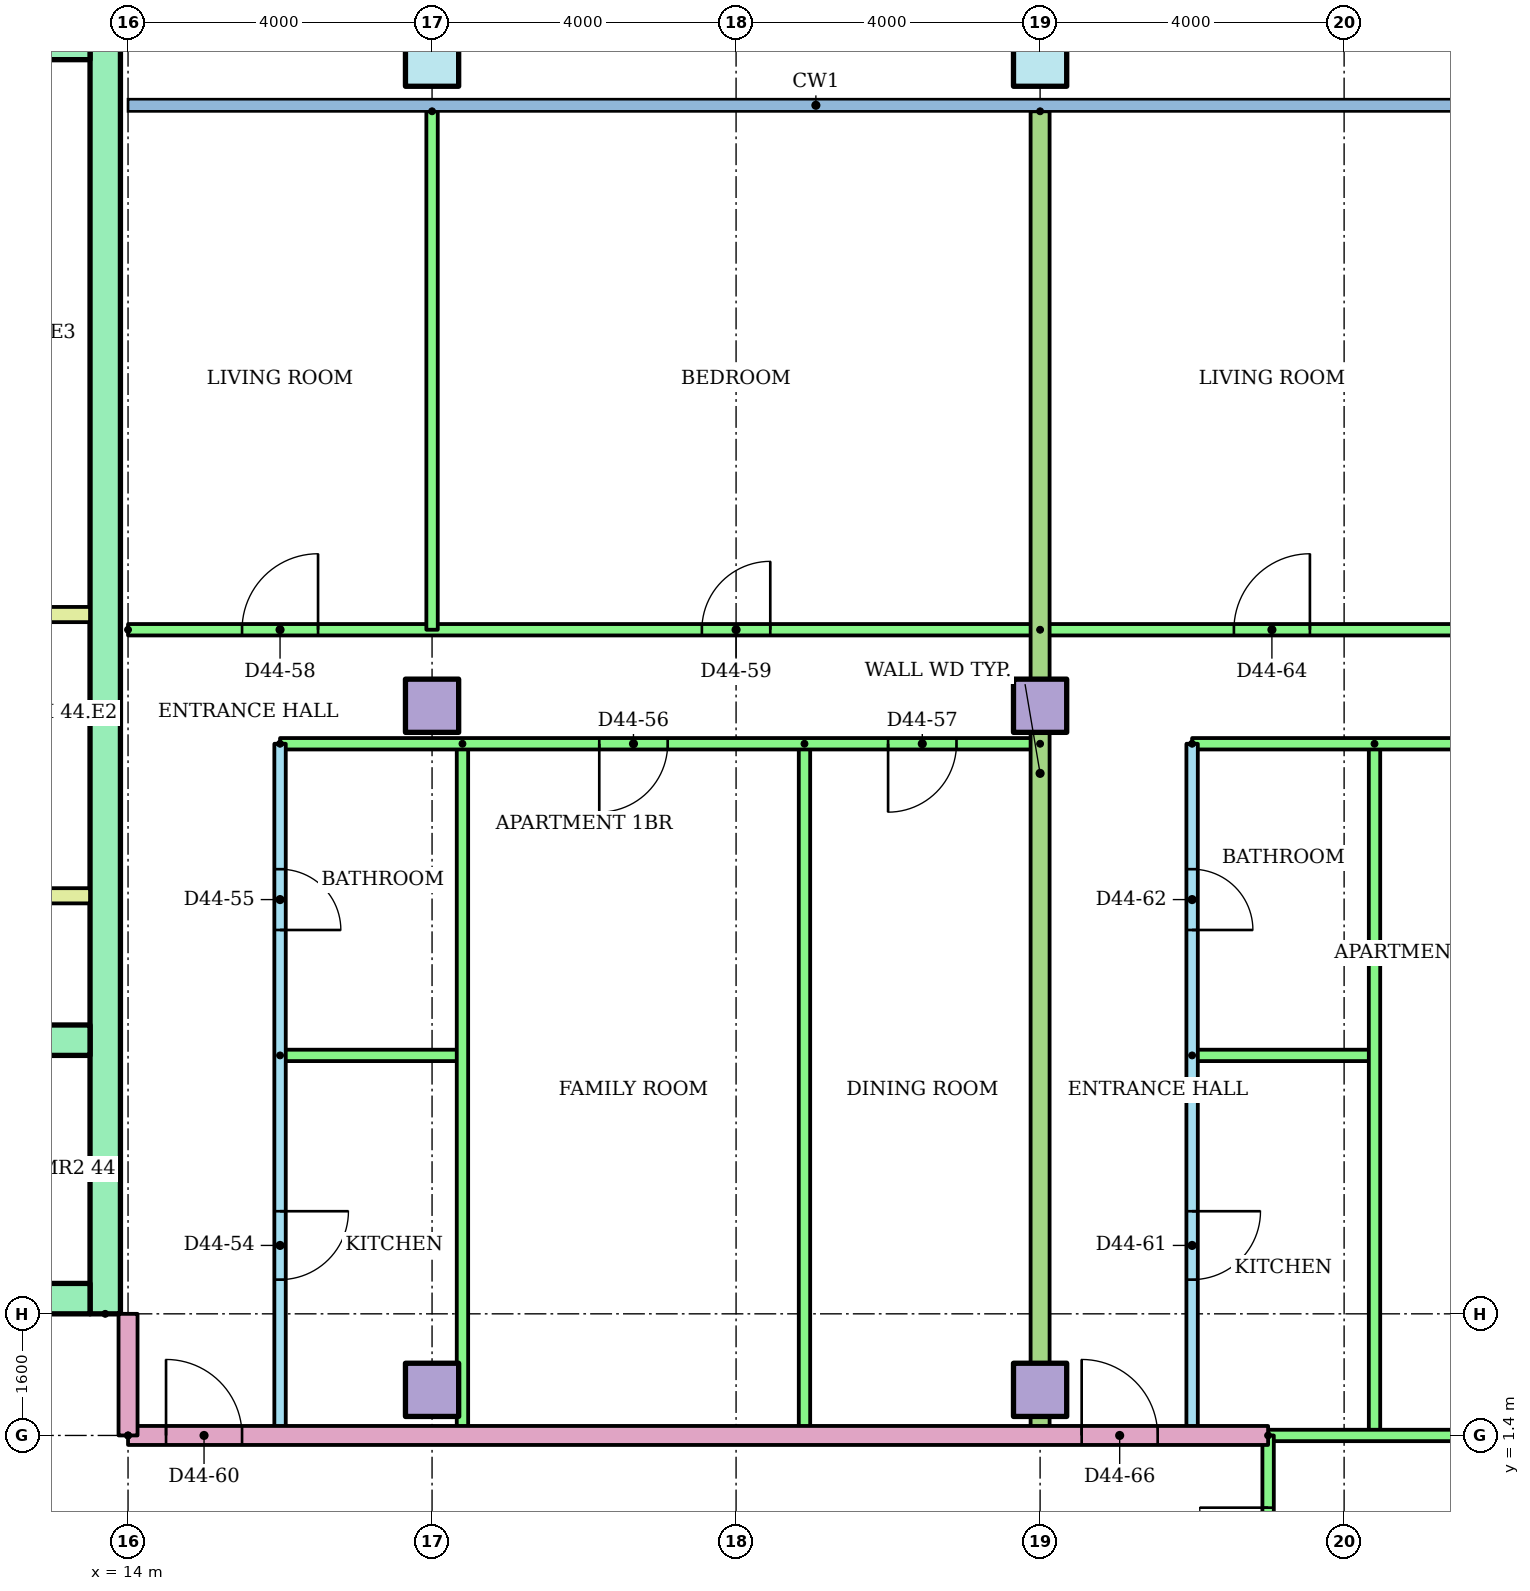
"""IFC4 building model, lengths in metres.
Left out: names, types, materials, properties, quantities, classifications, styles, units other than length and angle.
Written with IfcOpenShell. Run it as: python <this file> out.ifc"""

import sys

from ifc_helpers import new_model, si_unit, direction, frame, frame_2d, origin, origin_2d, place, context, subcontext, project, spatial, rectangle, hollow_rectangle, extrude, element, fill, save


model = new_model("IFC4")
c1 = context("Model", 3, precision=1e-05, world=origin(), true_north=direction((0.0, 1.0)))
c2 = subcontext(c1, "Body", "Model", "MODEL_VIEW")
j1 = project(units=[si_unit("LENGTHUNIT", "METRE"), si_unit("PLANEANGLEUNIT", "RADIAN")], contexts=[c1])
p1 = place(None, origin())
s1 = spatial("IfcSite", under=j1, at=p1, CompositionType="ELEMENT")
p2 = place(p1, origin())
s2 = spatial("IfcBuilding", under=s1, at=p2, CompositionType="ELEMENT")
p3 = place(p2, frame((0.0, 0.0, 171.7)))
s3 = spatial("IfcBuildingStorey", under=s2, at=p3, CompositionType="ELEMENT", Elevation=171.7)
for number, where in (
    (1, (18.0, 2.0, 0.0)),
    (2, (26.0, 2.0, 0.0)),
    (3, (18.0, 11.0, 0.0)),
    (4, (26.0, 11.0, 0.0)),
):
    element("IfcColumn", number, at=place(p3, frame(where)), inside=s3, PredefinedType="COLUMN", context=c2, shape_type="SweptSolid", body=[
        extrude(rectangle(XDim=0.7, YDim=0.7, at=origin_2d()), origin(), (0.0, 0.0, 1.0), 3.2),
    ])
for number, where in (
    (5, (18.0, 19.5, 0.0)),
    (6, (26.0, 19.5, 0.0)),
):
    element("IfcColumn", number, at=place(p3, frame(where)), inside=s3, PredefinedType="COLUMN", context=c2, shape_type="SweptSolid", body=[
        extrude(hollow_rectangle(XDim=0.7, YDim=0.7, WallThickness=0.036, at=origin_2d()), origin(), (0.0, 0.0, 1.0), 3.2),
    ])
p4 = place(p3, frame((13.7, 3.0, 0.0), z_axis=(0.0, 0.0, 1.0), x_axis=(0.0, 1.0, 0.0)))
e7 = element("IfcWall", 7, at=p4, inside=s3, PredefinedType="SHEAR", context=c2, shape_type="SweptSolid", body=[
    extrude(rectangle(XDim=17.0, YDim=0.4, at=frame_2d((8.5, 0.0))), origin(), (0.0, 0.0, 1.0), 2.92),
])
p5 = place(p3, frame((-13.5, 19.7, 0.0)))
e8 = element("IfcWall", 8, at=p5, inside=s3, PredefinedType="SHEAR", context=c2, shape_type="SweptSolid", body=[
    extrude(rectangle(XDim=27.0, YDim=0.4, at=frame_2d((13.5, 0.0))), origin(), (0.0, 0.0, 1.0), 2.92),
])
p6 = place(p3, frame((-13.5, 3.2, 0.0)))
e9 = element("IfcWall", 9, at=p6, inside=s3, PredefinedType="SHEAR", context=c2, shape_type="SweptSolid", body=[
    extrude(rectangle(XDim=27.0, YDim=0.4, at=frame_2d((13.5, 0.0))), origin(), (0.0, 0.0, 1.0), 2.92),
])
p7 = place(p6, frame((22.083, 0.0, 0.0)))
e10 = element("IfcOpeningElement", 10, at=p7, cuts=e9, PredefinedType="OPENING", context=c2, shape_type="SweptSolid", body=[
    extrude(rectangle(XDim=1.1, YDim=2.1, at=frame_2d((0.55, 1.05))), frame((0.0, 0.21, 0.0), z_axis=(0.0, -1.0, 0.0), x_axis=(1.0, 0.0, 0.0)), (0.0, 0.0, 1.0), 0.42),
])
p8 = place(p6, frame((25.128, 0.0, 0.0)))
e11 = element("IfcOpeningElement", 11, at=p8, cuts=e9, PredefinedType="OPENING", context=c2, shape_type="SweptSolid", body=[
    extrude(rectangle(XDim=1.1, YDim=2.1, at=frame_2d((0.55, 1.05))), frame((0.0, 0.21, 0.0), z_axis=(0.0, -1.0, 0.0), x_axis=(1.0, 0.0, 0.0)), (0.0, 0.0, 1.0), 0.42),
])
p9 = place(p6, frame((12.6, 0.0, 0.0)))
e12 = element("IfcOpeningElement", 12, at=p9, cuts=e9, PredefinedType="OPENING", context=c2, shape_type="SweptSolid", body=[
    extrude(rectangle(XDim=1.8, YDim=2.1, at=frame_2d((0.9, 1.05))), frame((0.0, 0.21, 0.0), z_axis=(0.0, -1.0, 0.0), x_axis=(1.0, 0.0, 0.0)), (0.0, 0.0, 1.0), 0.42),
])
p10 = place(p3, frame((1.522, 6.6, 0.0)))
e13 = element("IfcWall", 13, at=p10, inside=s3, PredefinedType="SHEAR", context=c2, shape_type="SweptSolid", body=[
    extrude(rectangle(XDim=11.978, YDim=0.4, at=frame_2d((5.989, 0.0))), origin(), (0.0, 0.0, 1.0), 2.92),
])
p11 = place(p10, frame((1.022, 0.0, 0.0)))
e14 = element("IfcOpeningElement", 14, at=p11, cuts=e13, PredefinedType="OPENING", context=c2, shape_type="SweptSolid", body=[
    extrude(rectangle(XDim=1.0, YDim=2.1, at=frame_2d((0.5, 1.05))), frame((0.0, 0.21, 0.0), z_axis=(0.0, -1.0, 0.0), x_axis=(1.0, 0.0, 0.0)), (0.0, 0.0, 1.0), 0.42),
])
p12 = place(p10, frame((4.067, 0.0, 0.0)))
e15 = element("IfcOpeningElement", 15, at=p12, cuts=e13, PredefinedType="OPENING", context=c2, shape_type="SweptSolid", body=[
    extrude(rectangle(XDim=1.0, YDim=2.1, at=frame_2d((0.5, 1.05))), frame((0.0, 0.21, 0.0), z_axis=(0.0, -1.0, 0.0), x_axis=(1.0, 0.0, 0.0)), (0.0, 0.0, 1.0), 0.42),
])
for number, where in (
    (16, (9.6, 8.5, 0.0)),
    (17, (9.6, 12.2, 0.0)),
):
    element("IfcWall", number, at=place(p3, frame(where)), inside=s3, PredefinedType="PARTITIONING", context=c2, shape_type="SweptSolid", body=[
        extrude(rectangle(XDim=3.9, YDim=0.2, at=frame_2d((1.95, 0.0))), origin(), (0.0, 0.0, 1.0), 2.92),
    ])
p13 = place(p3, frame((16.0, 10.5, 0.0), z_axis=(0.0, 0.0, 1.0), x_axis=(0.0, -1.0, 0.0)))
e18 = element("IfcWall", 18, at=p13, inside=s3, PredefinedType="PARTITIONING", context=c2, shape_type="SweptSolid", body=[
    extrude(rectangle(XDim=9.1, YDim=0.15, at=frame_2d((4.55, 0.0))), origin(), (0.0, 0.0, 1.0), 2.4),
])
p14 = place(p13, frame((6.15, 0.0, 0.0)))
e19 = element("IfcOpeningElement", 19, at=p14, cuts=e18, PredefinedType="OPENING", context=c2, shape_type="SweptSolid", body=[
    extrude(rectangle(XDim=0.9, YDim=2.1, at=frame_2d((0.45, 1.05))), frame((0.0, 0.085, 0.0), z_axis=(0.0, -1.0, 0.0), x_axis=(1.0, 0.0, 0.0)), (0.0, 0.0, 1.0), 0.17),
])
p15 = place(p13, frame((1.65, 0.0, 0.0)))
e20 = element("IfcOpeningElement", 20, at=p15, cuts=e18, PredefinedType="OPENING", context=c2, shape_type="SweptSolid", body=[
    extrude(rectangle(XDim=0.8, YDim=2.1, at=frame_2d((0.4, 1.05))), frame((0.0, 0.085, 0.0), z_axis=(0.0, -1.0, 0.0), x_axis=(1.0, 0.0, 0.0)), (0.0, 0.0, 1.0), 0.17),
])
p16 = place(p3, frame((16.0, 6.4, 0.0)))
e21 = element("IfcWall", 21, at=p16, inside=s3, PredefinedType="PARTITIONING", context=c2, shape_type="SweptSolid", body=[
    extrude(rectangle(XDim=2.4, YDim=0.15, at=frame_2d((1.2, 0.0))), origin(), (0.0, 0.0, 1.0), 2.4),
])
for number, where, z_axis, x_axis in (
    (22, (18.4, 10.5, 0.0), (0.0, 0.0, 1.0), (0.0, -1.0, 0.0)),
    (23, (22.9, 10.5, 0.0), (0.0, 0.0, 1.0), (0.0, -1.0, 0.0)),
):
    element("IfcWall", number, at=place(p3, frame(where, z_axis=z_axis, x_axis=x_axis)), inside=s3, PredefinedType="PARTITIONING", context=c2, shape_type="SweptSolid", body=[
        extrude(rectangle(XDim=9.1, YDim=0.15, at=frame_2d((4.55, 0.0))), origin(), (0.0, 0.0, 1.0), 2.4),
    ])
p17 = place(p3, frame((26.0, 10.5, 0.0), z_axis=(0.0, 0.0, 1.0), x_axis=(-1.0, 0.0, 0.0)))
e24 = element("IfcWall", 24, at=p17, inside=s3, PredefinedType="PARTITIONING", context=c2, shape_type="SweptSolid", body=[
    extrude(rectangle(XDim=10.0, YDim=0.15, at=frame_2d((5.0, 0.0))), origin(), (0.0, 0.0, 1.0), 2.4),
])
p18 = place(p17, frame((4.9, 0.0, 0.0)))
e25 = element("IfcOpeningElement", 25, at=p18, cuts=e24, PredefinedType="OPENING", context=c2, shape_type="SweptSolid", body=[
    extrude(rectangle(XDim=0.9, YDim=2.1, at=frame_2d((0.45, 1.05))), frame((0.0, 0.085, 0.0), z_axis=(0.0, -1.0, 0.0), x_axis=(1.0, 0.0, 0.0)), (0.0, 0.0, 1.0), 0.17),
])
p19 = place(p17, frame((1.1, 0.0, 0.0)))
e26 = element("IfcOpeningElement", 26, at=p19, cuts=e24, PredefinedType="OPENING", context=c2, shape_type="SweptSolid", body=[
    extrude(rectangle(XDim=0.9, YDim=2.1, at=frame_2d((0.45, 1.05))), frame((0.0, 0.085, 0.0), z_axis=(0.0, -1.0, 0.0), x_axis=(1.0, 0.0, 0.0)), (0.0, 0.0, 1.0), 0.17),
])
p20 = place(p3, frame((14.0, 12.0, 0.0)))
e27 = element("IfcWall", 27, at=p20, inside=s3, PredefinedType="PARTITIONING", context=c2, shape_type="SweptSolid", body=[
    extrude(rectangle(XDim=12.0, YDim=0.15, at=frame_2d((6.0, 0.0))), origin(), (0.0, 0.0, 1.0), 2.4),
])
p21 = place(p20, frame((1.5, 0.0, 0.0)))
e28 = element("IfcOpeningElement", 28, at=p21, cuts=e27, PredefinedType="OPENING", context=c2, shape_type="SweptSolid", body=[
    extrude(rectangle(XDim=1.0, YDim=2.1, at=frame_2d((0.5, 1.05))), frame((0.0, 0.085, 0.0), z_axis=(0.0, -1.0, 0.0), x_axis=(1.0, 0.0, 0.0)), (0.0, 0.0, 1.0), 0.17),
])
p22 = place(p20, frame((7.55, 0.0, 0.0)))
e29 = element("IfcOpeningElement", 29, at=p22, cuts=e27, PredefinedType="OPENING", context=c2, shape_type="SweptSolid", body=[
    extrude(rectangle(XDim=0.9, YDim=2.1, at=frame_2d((0.45, 1.05))), frame((0.0, 0.085, 0.0), z_axis=(0.0, -1.0, 0.0), x_axis=(1.0, 0.0, 0.0)), (0.0, 0.0, 1.0), 0.17),
])
p23 = place(p3, frame((18.0, 18.821, 0.0), z_axis=(0.0, 0.0, 1.0), x_axis=(0.0, -1.0, 0.0)))
e30 = element("IfcWall", 30, at=p23, inside=s3, PredefinedType="PARTITIONING", context=c2, shape_type="SweptSolid", body=[
    extrude(rectangle(XDim=6.821, YDim=0.15, at=frame_2d((3.411, 0.0))), origin(), (0.0, 0.0, 1.0), 2.4),
])
p24 = place(p3, frame((28.0, 10.5, 0.0), z_axis=(0.0, 0.0, 1.0), x_axis=(0.0, -1.0, 0.0)))
e31 = element("IfcWall", 31, at=p24, inside=s3, PredefinedType="PARTITIONING", context=c2, shape_type="SweptSolid", body=[
    extrude(rectangle(XDim=9.1, YDim=0.15, at=frame_2d((4.55, 0.0))), origin(), (0.0, 0.0, 1.0), 2.4),
])
p25 = place(p24, frame((6.15, 0.0, 0.0)))
e32 = element("IfcOpeningElement", 32, at=p25, cuts=e31, PredefinedType="OPENING", context=c2, shape_type="SweptSolid", body=[
    extrude(rectangle(XDim=0.9, YDim=2.1, at=frame_2d((0.45, 1.05))), frame((0.0, 0.085, 0.0), z_axis=(0.0, -1.0, 0.0), x_axis=(1.0, 0.0, 0.0)), (0.0, 0.0, 1.0), 0.17),
])
p26 = place(p24, frame((1.65, 0.0, 0.0)))
e33 = element("IfcOpeningElement", 33, at=p26, cuts=e31, PredefinedType="OPENING", context=c2, shape_type="SweptSolid", body=[
    extrude(rectangle(XDim=0.8, YDim=2.1, at=frame_2d((0.4, 1.05))), frame((0.0, 0.085, 0.0), z_axis=(0.0, -1.0, 0.0), x_axis=(1.0, 0.0, 0.0)), (0.0, 0.0, 1.0), 0.17),
])
p27 = place(p3, frame((28.0, 6.4, 0.0)))
e34 = element("IfcWall", 34, at=p27, inside=s3, PredefinedType="PARTITIONING", context=c2, shape_type="SweptSolid", body=[
    extrude(rectangle(XDim=2.4, YDim=0.15, at=frame_2d((1.2, 0.0))), origin(), (0.0, 0.0, 1.0), 2.4),
])
p28 = place(p3, frame((30.4, 10.5, 0.0), z_axis=(0.0, 0.0, 1.0), x_axis=(0.0, -1.0, 0.0)))
e35 = element("IfcWall", 35, at=p28, inside=s3, PredefinedType="PARTITIONING", context=c2, shape_type="SweptSolid", body=[
    extrude(rectangle(XDim=9.1, YDim=0.15, at=frame_2d((4.55, 0.0))), origin(), (0.0, 0.0, 1.0), 2.4),
])
p29 = place(p3, frame((36.81, 10.5, 0.0), z_axis=(0.0, 0.0, 1.0), x_axis=(-1.0, 0.0, 0.0)))
e36 = element("IfcWall", 36, at=p29, inside=s3, PredefinedType="PARTITIONING", context=c2, shape_type="SweptSolid", body=[
    extrude(rectangle(XDim=8.81, YDim=0.15, at=frame_2d((4.405, 0.0))), origin(), (0.0, 0.0, 1.0), 2.4),
])
p30 = place(p29, frame((3.357, 0.0, 0.0)))
e37 = element("IfcOpeningElement", 37, at=p30, cuts=e36, PredefinedType="OPENING", context=c2, shape_type="SweptSolid", body=[
    extrude(rectangle(XDim=0.9, YDim=2.1, at=frame_2d((0.45, 1.05))), frame((0.0, 0.085, 0.0), z_axis=(0.0, -1.0, 0.0), x_axis=(1.0, 0.0, 0.0)), (0.0, 0.0, 1.0), 0.17),
])
p31 = place(p3, frame((26.0, 12.0, 0.0)))
e38 = element("IfcWall", 38, at=p31, inside=s3, PredefinedType="PARTITIONING", context=c2, shape_type="SweptSolid", body=[
    extrude(rectangle(XDim=10.82, YDim=0.15, at=frame_2d((5.41, 0.0))), origin(), (0.0, 0.0, 1.0), 2.4),
])
p32 = place(p31, frame((2.55, 0.0, 0.0)))
e39 = element("IfcOpeningElement", 39, at=p32, cuts=e38, PredefinedType="OPENING", context=c2, shape_type="SweptSolid", body=[
    extrude(rectangle(XDim=1.0, YDim=2.1, at=frame_2d((0.5, 1.05))), frame((0.0, 0.085, 0.0), z_axis=(0.0, -1.0, 0.0), x_axis=(1.0, 0.0, 0.0)), (0.0, 0.0, 1.0), 0.17),
])
p33 = place(p31, frame((8.547, 0.0, 0.0)))
e40 = element("IfcOpeningElement", 40, at=p33, cuts=e38, PredefinedType="OPENING", context=c2, shape_type="SweptSolid", body=[
    extrude(rectangle(XDim=1.0, YDim=2.1, at=frame_2d((0.5, 1.05))), frame((0.0, 0.085, 0.0), z_axis=(0.0, -1.0, 0.0), x_axis=(1.0, 0.0, 0.0)), (0.0, 0.0, 1.0), 0.17),
])
p34 = place(p3, frame((26.0, 18.821, 0.0), z_axis=(0.0, 0.0, 1.0), x_axis=(0.0, -1.0, 0.0)))
e41 = element("IfcWall", 41, at=p34, inside=s3, PredefinedType="PARTITIONING", context=c2, shape_type="SweptSolid", body=[
    extrude(rectangle(XDim=17.421, YDim=0.25, at=frame_2d((8.71, 0.0))), origin(), (0.0, 0.0, 1.0), 2.4),
])
p35 = place(p3, frame((14.0, 1.4, 0.0)))
e42 = element("IfcWall", 42, at=p35, inside=s3, PredefinedType="PARTITIONING", context=c2, shape_type="SweptSolid", body=[
    extrude(rectangle(XDim=15.0, YDim=0.25, at=frame_2d((7.5, 0.0))), origin(), (0.0, 0.0, 1.0), 2.4),
])
p36 = place(p35, frame((0.5, 0.0, 0.0)))
e43 = element("IfcOpeningElement", 43, at=p36, cuts=e42, PredefinedType="OPENING", context=c2, shape_type="SweptSolid", body=[
    extrude(rectangle(XDim=1.0, YDim=2.1, at=frame_2d((0.5, 1.05))), frame((0.0, 0.135, 0.0), z_axis=(0.0, -1.0, 0.0), x_axis=(1.0, 0.0, 0.0)), (0.0, 0.0, 1.0), 0.27),
])
p37 = place(p35, frame((12.547, 0.0, 0.0)))
e44 = element("IfcOpeningElement", 44, at=p37, cuts=e42, PredefinedType="OPENING", context=c2, shape_type="SweptSolid", body=[
    extrude(rectangle(XDim=1.0, YDim=2.1, at=frame_2d((0.5, 1.05))), frame((0.0, 0.135, 0.0), z_axis=(0.0, -1.0, 0.0), x_axis=(1.0, 0.0, 0.0)), (0.0, 0.0, 1.0), 0.27),
])
p38 = place(p3, frame((29.0, 1.4, 0.0)))
e45 = element("IfcWall", 45, at=p38, inside=s3, PredefinedType="PARTITIONING", context=c2, shape_type="SweptSolid", body=[
    extrude(rectangle(XDim=7.82, YDim=0.15, at=frame_2d((3.91, 0.0))), origin(), (0.0, 0.0, 1.0), 2.4),
])
p39 = place(p3, frame((29.0, -1.4, 0.0), z_axis=(0.0, 0.0, 1.0), x_axis=(0.0, 1.0, 0.0)))
e46 = element("IfcWall", 46, at=p39, inside=s3, PredefinedType="PARTITIONING", context=c2, shape_type="SweptSolid", body=[
    extrude(rectangle(XDim=2.8, YDim=0.15, at=frame_2d((1.4, 0.0))), origin(), (0.0, 0.0, 1.0), 2.4),
])
p40 = place(p39, frame((0.95, 0.0, 0.0)))
e47 = element("IfcOpeningElement", 47, at=p40, cuts=e46, PredefinedType="OPENING", context=c2, shape_type="SweptSolid", body=[
    extrude(rectangle(XDim=0.9, YDim=2.1, at=frame_2d((0.45, 1.05))), frame((0.0, 0.085, 0.0), z_axis=(0.0, -1.0, 0.0), x_axis=(1.0, 0.0, 0.0)), (0.0, 0.0, 1.0), 0.17),
])
p41 = place(p3, frame((14.0, 1.4, 0.0), z_axis=(0.0, 0.0, 1.0), x_axis=(0.0, 1.0, 0.0)))
e48 = element("IfcWall", 48, at=p41, inside=s3, PredefinedType="PARTITIONING", context=c2, shape_type="SweptSolid", body=[
    extrude(rectangle(XDim=1.6, YDim=0.25, at=frame_2d((0.8, 0.0))), origin(), (0.0, 0.0, 1.0), 2.4),
])
p42 = place(p14, origin())
e49 = element("IfcDoor", 49, at=p42, inside=s3, OperationType="SINGLE_SWING_LEFT", PredefinedType="DOOR", context=c2, shape_type="SweptSolid", body=[
    extrude(rectangle(XDim=0.9, YDim=2.1, at=frame_2d((0.45, 1.05))), frame((0.0, 0.025, 0.0), z_axis=(0.0, -1.0, 0.0), x_axis=(1.0, 0.0, 0.0)), (0.0, 0.0, 1.0), 0.05),
])
fill(e19, e49)
p43 = place(p15, origin())
e50 = element("IfcDoor", 50, at=p43, inside=s3, OperationType="SINGLE_SWING_RIGHT", PredefinedType="DOOR", context=c2, shape_type="SweptSolid", body=[
    extrude(rectangle(XDim=0.8, YDim=2.1, at=frame_2d((0.4, 1.05))), frame((0.0, 0.025, 0.0), z_axis=(0.0, -1.0, 0.0), x_axis=(1.0, 0.0, 0.0)), (0.0, 0.0, 1.0), 0.05),
])
fill(e20, e50)
p44 = place(p18, origin())
e51 = element("IfcDoor", 51, at=p44, inside=s3, OperationType="SINGLE_SWING_RIGHT", PredefinedType="DOOR", context=c2, shape_type="SweptSolid", body=[
    extrude(rectangle(XDim=0.9, YDim=2.1, at=frame_2d((0.45, 1.05))), frame((0.0, 0.025, 0.0), z_axis=(0.0, -1.0, 0.0), x_axis=(1.0, 0.0, 0.0)), (0.0, 0.0, 1.0), 0.05),
])
fill(e25, e51)
p45 = place(p19, origin())
e52 = element("IfcDoor", 52, at=p45, inside=s3, OperationType="SINGLE_SWING_RIGHT", PredefinedType="DOOR", context=c2, shape_type="SweptSolid", body=[
    extrude(rectangle(XDim=0.9, YDim=2.1, at=frame_2d((0.45, 1.05))), frame((0.0, 0.025, 0.0), z_axis=(0.0, -1.0, 0.0), x_axis=(1.0, 0.0, 0.0)), (0.0, 0.0, 1.0), 0.05),
])
fill(e26, e52)
p46 = place(p21, origin())
e53 = element("IfcDoor", 53, at=p46, inside=s3, OperationType="SINGLE_SWING_RIGHT", PredefinedType="DOOR", context=c2, shape_type="SweptSolid", body=[
    extrude(rectangle(XDim=1.0, YDim=2.1, at=frame_2d((0.5, 1.05))), frame((0.0, 0.025, 0.0), z_axis=(0.0, -1.0, 0.0), x_axis=(1.0, 0.0, 0.0)), (0.0, 0.0, 1.0), 0.05),
])
fill(e28, e53)
p47 = place(p22, origin())
e54 = element("IfcDoor", 54, at=p47, inside=s3, OperationType="SINGLE_SWING_RIGHT", PredefinedType="DOOR", context=c2, shape_type="SweptSolid", body=[
    extrude(rectangle(XDim=0.9, YDim=2.1, at=frame_2d((0.45, 1.05))), frame((0.0, 0.025, 0.0), z_axis=(0.0, -1.0, 0.0), x_axis=(1.0, 0.0, 0.0)), (0.0, 0.0, 1.0), 0.05),
])
fill(e29, e54)
p48 = place(p36, origin())
e55 = element("IfcDoor", 55, at=p48, inside=s3, OperationType="SINGLE_SWING_LEFT", PredefinedType="DOOR", context=c2, shape_type="SweptSolid", body=[
    extrude(rectangle(XDim=1.0, YDim=2.1, at=frame_2d((0.5, 1.05))), frame((0.0, 0.025, 0.0), z_axis=(0.0, -1.0, 0.0), x_axis=(1.0, 0.0, 0.0)), (0.0, 0.0, 1.0), 0.05),
])
fill(e43, e55)
p49 = place(p25, origin())
e56 = element("IfcDoor", 56, at=p49, inside=s3, OperationType="SINGLE_SWING_LEFT", PredefinedType="DOOR", context=c2, shape_type="SweptSolid", body=[
    extrude(rectangle(XDim=0.9, YDim=2.1, at=frame_2d((0.45, 1.05))), frame((0.0, 0.025, 0.0), z_axis=(0.0, -1.0, 0.0), x_axis=(1.0, 0.0, 0.0)), (0.0, 0.0, 1.0), 0.05),
])
fill(e32, e56)
p50 = place(p26, origin())
e57 = element("IfcDoor", 57, at=p50, inside=s3, OperationType="SINGLE_SWING_RIGHT", PredefinedType="DOOR", context=c2, shape_type="SweptSolid", body=[
    extrude(rectangle(XDim=0.8, YDim=2.1, at=frame_2d((0.4, 1.05))), frame((0.0, 0.025, 0.0), z_axis=(0.0, -1.0, 0.0), x_axis=(1.0, 0.0, 0.0)), (0.0, 0.0, 1.0), 0.05),
])
fill(e33, e57)
p51 = place(p32, origin())
e58 = element("IfcDoor", 58, at=p51, inside=s3, OperationType="SINGLE_SWING_RIGHT", PredefinedType="DOOR", context=c2, shape_type="SweptSolid", body=[
    extrude(rectangle(XDim=1.0, YDim=2.1, at=frame_2d((0.5, 1.05))), frame((0.0, 0.025, 0.0), z_axis=(0.0, -1.0, 0.0), x_axis=(1.0, 0.0, 0.0)), (0.0, 0.0, 1.0), 0.05),
])
fill(e39, e58)
p52 = place(p37, origin())
e59 = element("IfcDoor", 59, at=p52, inside=s3, OperationType="SINGLE_SWING_LEFT", PredefinedType="DOOR", context=c2, shape_type="SweptSolid", body=[
    extrude(rectangle(XDim=1.0, YDim=2.1, at=frame_2d((0.5, 1.05))), frame((0.0, 0.025, 0.0), z_axis=(0.0, -1.0, 0.0), x_axis=(1.0, 0.0, 0.0)), (0.0, 0.0, 1.0), 0.05),
])
fill(e44, e59)
p53 = place(p40, origin())
e60 = element("IfcDoor", 60, at=p53, inside=s3, OperationType="SINGLE_SWING_RIGHT", PredefinedType="DOOR", context=c2, shape_type="SweptSolid", body=[
    extrude(rectangle(XDim=0.9, YDim=2.1, at=frame_2d((0.45, 1.05))), frame((0.0, 0.025, 0.0), z_axis=(0.0, -1.0, 0.0), x_axis=(1.0, 0.0, 0.0)), (0.0, 0.0, 1.0), 0.05),
])
fill(e47, e60)
save(model, sys.argv[1])
